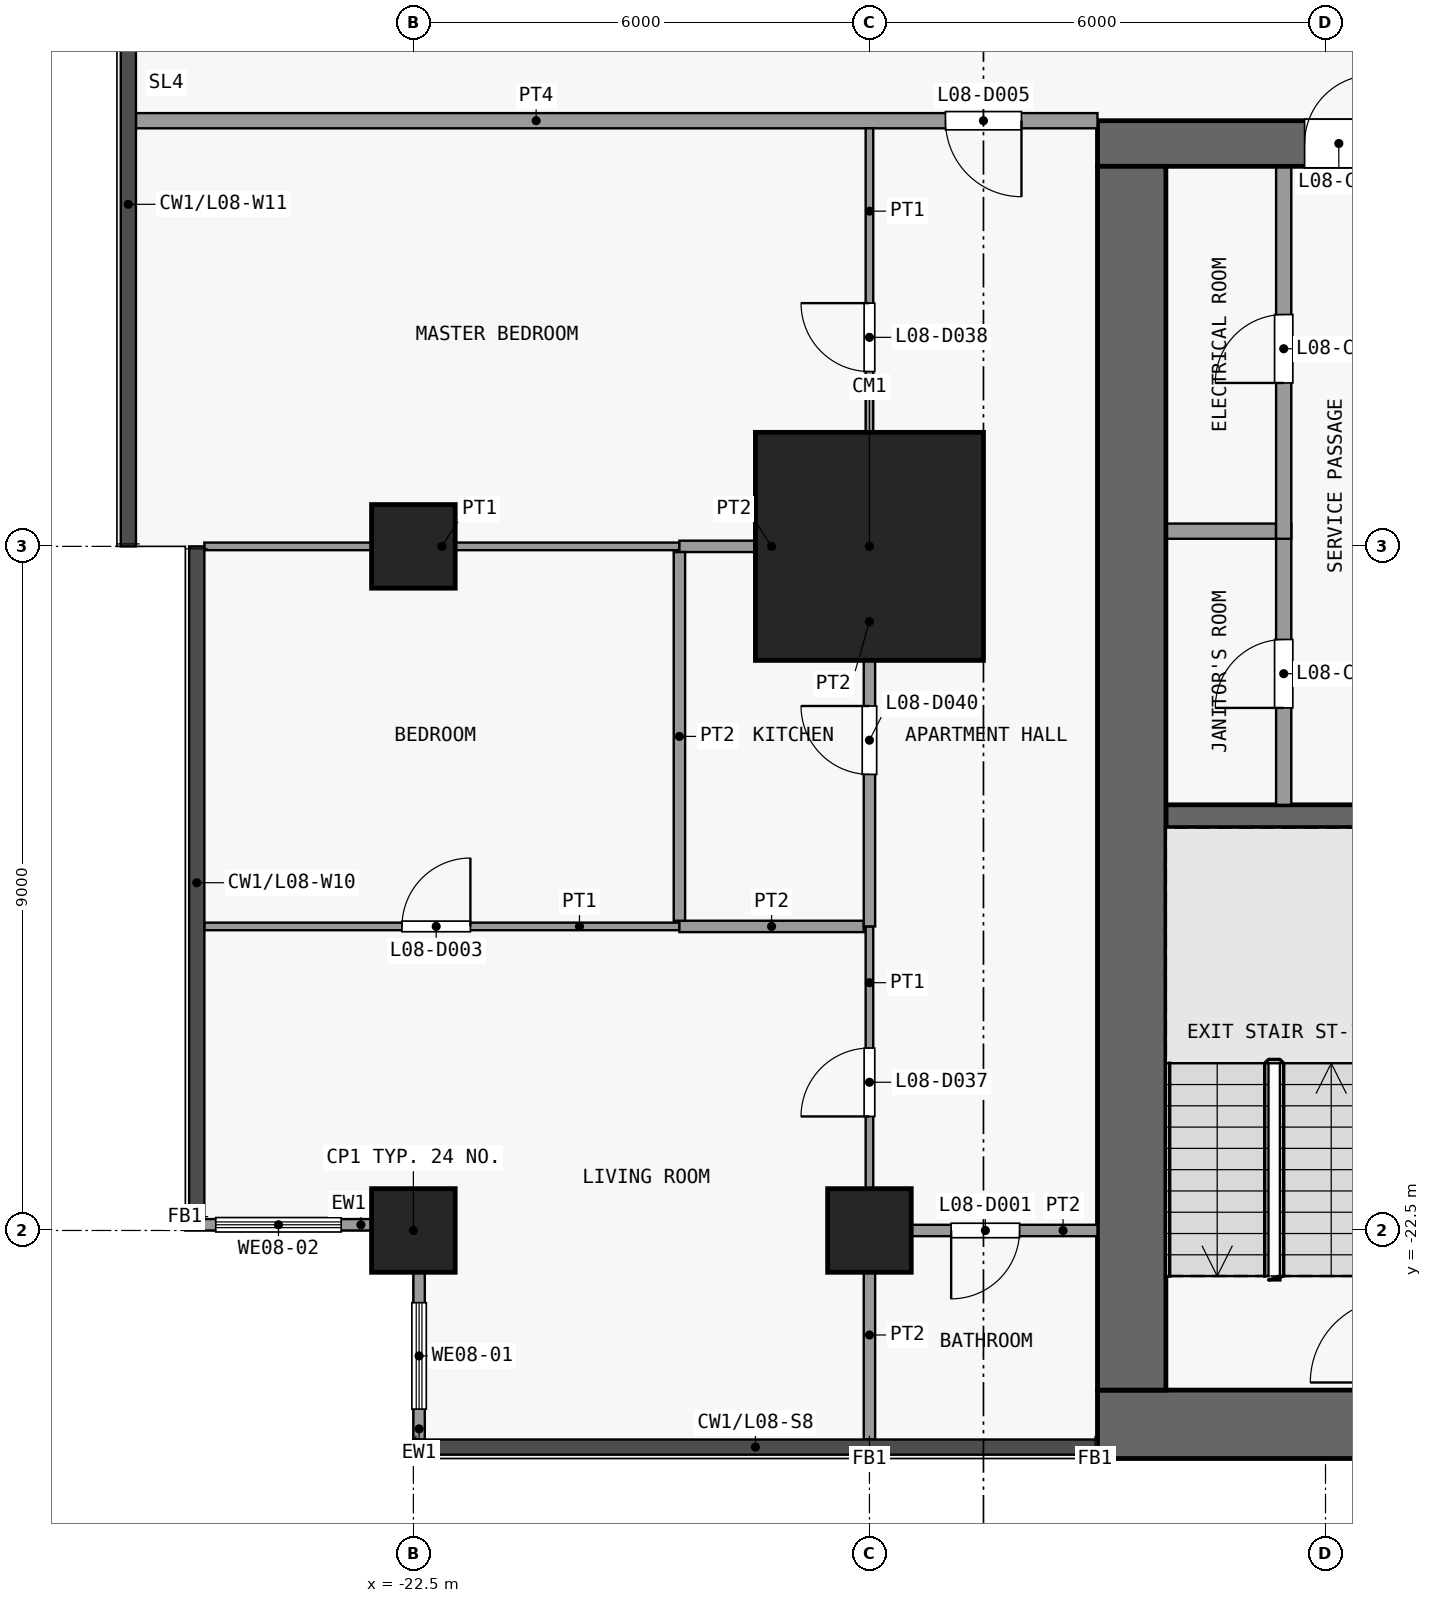
"""IFC4 building model, lengths in metres.
Left out: names, types, materials, properties, quantities, classifications, styles, units other than length and angle.
Written with IfcOpenShell. Run it as: python <this file> out.ifc"""

import sys

from ifc_helpers import new_model, si_unit, direction, frame, frame_2d, origin, origin_2d, place, context, subcontext, project, spatial, rectangle, extrude, element, fill, save


model = new_model("IFC4")
c1 = context("Model", 3, precision=1e-05, world=origin(), true_north=direction((0.0, 1.0)))
c2 = subcontext(c1, "Body", "Model", "MODEL_VIEW")
j1 = project(units=[si_unit("LENGTHUNIT", "METRE"), si_unit("PLANEANGLEUNIT", "RADIAN")], contexts=[c1])
p1 = place(None, origin())
s1 = spatial("IfcSite", under=j1, at=p1, CompositionType="ELEMENT")
p2 = place(p1, origin())
s2 = spatial("IfcBuilding", under=s1, at=p2, CompositionType="ELEMENT")
p3 = place(p2, frame((0.0, 0.0, 39.7)))
s3 = spatial("IfcBuildingStorey", under=s2, at=p3, CompositionType="ELEMENT", Elevation=39.7)
for number, where, z_axis, x_axis in (
    (1, (-22.5, -22.5, 0.0), (0.0, 0.0, 1.0), (1.0, 0.0, 0.0)),
    (2, (-22.5, -13.5, 0.0), (0.0, 0.0, 1.0), (1.0, 0.0, 0.0)),
    (3, (-16.5, -22.5, 0.0), (0.0, 0.0, 1.0), (1.0, 0.0, 0.0)),
):
    element("IfcColumn", number, at=place(p3, frame(where, z_axis=z_axis, x_axis=x_axis)), inside=s3, PredefinedType="COLUMN", context=c2, shape_type="SweptSolid", body=[
        extrude(rectangle(XDim=1.1, YDim=1.1, at=origin_2d()), origin(), (0.0, 0.0, 1.0), 3.6),
    ])
p4 = place(p3, frame((-16.5, -13.5, 0.0), z_axis=(0.0, 0.0, 1.0), x_axis=(1.0, 0.0, 0.0)))
e4 = element("IfcColumn", 4, at=p4, inside=s3, PredefinedType="COLUMN", context=c2, shape_type="SweptSolid", body=[
    extrude(rectangle(XDim=3.0, YDim=3.0, at=origin_2d()), origin(), (0.0, 0.0, 1.0), 3.6),
])
p5 = place(p3, frame((-13.5, -25.05, 0.0), z_axis=(0.0, 0.0, 1.0), x_axis=(1.0, 0.0, 0.0)))
e5 = element("IfcWall", 5, at=p5, inside=s3, PredefinedType="SHEAR", context=c2, shape_type="SweptSolid", body=[
    extrude(rectangle(XDim=27.0, YDim=0.9, at=frame_2d((13.5, 0.0))), origin(), (0.0, 0.0, 1.0), 3.3),
])
p6 = place(p3, frame((-13.5, -8.2, 0.0), z_axis=(0.0, 0.0, 1.0), x_axis=(1.0, 0.0, 0.0)))
e6 = element("IfcWall", 6, at=p6, inside=s3, PredefinedType="SHEAR", context=c2, shape_type="SweptSolid", body=[
    extrude(rectangle(XDim=27.0, YDim=0.6, at=frame_2d((13.5, 0.0))), origin(), (0.0, 0.0, 1.0), 3.3),
])
p7 = place(p6, frame((7.8, 0.0, 0.0)))
e7 = element("IfcOpeningElement", 7, at=p7, cuts=e6, PredefinedType="OPENING", context=c2, shape_type="SweptSolid", body=[
    extrude(rectangle(XDim=1.8, YDim=2.1, at=frame_2d((0.9, 1.05))), frame((0.0, 0.31, 0.0), z_axis=(0.0, -1.0, 0.0), x_axis=(1.0, 0.0, 0.0)), (0.0, 0.0, 1.0), 0.62),
])
p8 = place(p6, frame((17.4, 0.0, 0.0)))
e8 = element("IfcOpeningElement", 8, at=p8, cuts=e6, PredefinedType="OPENING", context=c2, shape_type="SweptSolid", body=[
    extrude(rectangle(XDim=1.8, YDim=2.1, at=frame_2d((0.9, 1.05))), frame((0.0, 0.31, 0.0), z_axis=(0.0, -1.0, 0.0), x_axis=(1.0, 0.0, 0.0)), (0.0, 0.0, 1.0), 0.62),
])
p9 = place(p6, frame((2.725, 0.0, 0.0)))
e9 = element("IfcOpeningElement", 9, at=p9, cuts=e6, PredefinedType="OPENING", context=c2, shape_type="SweptSolid", body=[
    extrude(rectangle(XDim=0.9, YDim=2.1, at=frame_2d((0.45, 1.05))), frame((0.0, 0.31, 0.0), z_axis=(0.0, -1.0, 0.0), x_axis=(1.0, 0.0, 0.0)), (0.0, 0.0, 1.0), 0.62),
])
p10 = place(p6, frame((23.375, 0.0, 0.0)))
e10 = element("IfcOpeningElement", 10, at=p10, cuts=e6, PredefinedType="OPENING", context=c2, shape_type="SweptSolid", body=[
    extrude(rectangle(XDim=0.9, YDim=2.1, at=frame_2d((0.45, 1.05))), frame((0.0, 0.31, 0.0), z_axis=(0.0, -1.0, 0.0), x_axis=(1.0, 0.0, 0.0)), (0.0, 0.0, 1.0), 0.62),
])
p11 = place(p3, frame((-13.05, -24.6, 0.0), z_axis=(0.0, 0.0, 1.0), x_axis=(0.0, 1.0, 0.0)))
e11 = element("IfcWall", 11, at=p11, inside=s3, PredefinedType="SHEAR", context=c2, shape_type="SweptSolid", body=[
    extrude(rectangle(XDim=16.1, YDim=0.9, at=frame_2d((8.05, 0.0))), origin(), (0.0, 0.0, 1.0), 3.3),
])
p12 = place(p3, frame((-12.6, -17.05, 0.0), z_axis=(0.0, 0.0, 1.0), x_axis=(1.0, 0.0, 0.0)))
e12 = element("IfcWall", 12, at=p12, inside=s3, PredefinedType="SHEAR", context=c2, shape_type="SweptSolid", body=[
    extrude(rectangle(XDim=2.85, YDim=0.3, at=frame_2d((1.425, 0.0))), origin(), (0.0, 0.0, 1.0), 3.3),
])
p13 = place(p3, frame((-12.6, -13.3, 0.0), z_axis=(0.0, 0.0, 1.0), x_axis=(1.0, 0.0, 0.0)))
e13 = element("IfcWall", 13, at=p13, inside=s3, PredefinedType="PARTITIONING", context=c2, shape_type="SweptSolid", body=[
    extrude(rectangle(XDim=1.45, YDim=0.2, at=frame_2d((0.725, 0.0))), origin(), (0.0, 0.0, 1.0), 3.3),
])
p14 = place(p3, frame((-11.05, -16.9, 0.0), z_axis=(0.0, 0.0, 1.0), x_axis=(0.0, 1.0, 0.0)))
e14 = element("IfcWall", 14, at=p14, inside=s3, PredefinedType="PARTITIONING", context=c2, shape_type="SweptSolid", body=[
    extrude(rectangle(XDim=3.7, YDim=0.2, at=frame_2d((1.85, 0.0))), origin(), (0.0, 0.0, 1.0), 3.3),
])
p15 = place(p14, frame((1.275, 0.0, 0.0)))
e15 = element("IfcOpeningElement", 15, at=p15, cuts=e14, PredefinedType="OPENING", context=c2, shape_type="SweptSolid", body=[
    extrude(rectangle(XDim=0.9, YDim=2.1, at=frame_2d((0.45, 1.05))), frame((0.0, 0.11, 0.0), z_axis=(0.0, -1.0, 0.0), x_axis=(1.0, 0.0, 0.0)), (0.0, 0.0, 1.0), 0.22),
])
p16 = place(p3, frame((-11.05, -13.4, 0.0), z_axis=(0.0, 0.0, 1.0), x_axis=(0.0, 1.0, 0.0)))
e16 = element("IfcWall", 16, at=p16, inside=s3, PredefinedType="PARTITIONING", context=c2, shape_type="SweptSolid", body=[
    extrude(rectangle(XDim=4.9, YDim=0.2, at=frame_2d((2.45, 0.0))), origin(), (0.0, 0.0, 1.0), 3.3),
])
p17 = place(p16, frame((2.05, 0.0, 0.0)))
e17 = element("IfcOpeningElement", 17, at=p17, cuts=e16, PredefinedType="OPENING", context=c2, shape_type="SweptSolid", body=[
    extrude(rectangle(XDim=0.9, YDim=2.1, at=frame_2d((0.45, 1.05))), frame((0.0, 0.11, 0.0), z_axis=(0.0, -1.0, 0.0), x_axis=(1.0, 0.0, 0.0)), (0.0, 0.0, 1.0), 0.22),
])
p18 = place(p3, frame((-22.425, -25.25, 0.0), z_axis=(0.0, 0.0, 1.0), x_axis=(0.0, 1.0, 0.0)))
e18 = element("IfcWall", 18, at=p18, inside=s3, PredefinedType="SOLIDWALL", context=c2, shape_type="SweptSolid", body=[
    extrude(rectangle(XDim=2.2, YDim=0.15, at=frame_2d((1.1, 0.0))), origin(), (0.0, 0.0, 1.0), 3.3),
])
p19 = place(p18, frame((0.4, 0.0, 0.9)))
e19 = element("IfcOpeningElement", 19, at=p19, cuts=e18, PredefinedType="OPENING", context=c2, shape_type="SweptSolid", body=[
    extrude(rectangle(XDim=1.4, YDim=2.4, at=frame_2d((0.7, 1.2))), frame((0.0, 0.085, 0.0), z_axis=(0.0, -1.0, 0.0), x_axis=(1.0, 0.0, 0.0)), (0.0, 0.0, 1.0), 0.17),
])
p20 = place(p3, frame((-23.05, -22.425, 0.0), z_axis=(0.0, 0.0, 1.0), x_axis=(-1.0, 0.0, 0.0)))
e20 = element("IfcWall", 20, at=p20, inside=s3, PredefinedType="SOLIDWALL", context=c2, shape_type="SweptSolid", body=[
    extrude(rectangle(XDim=2.45, YDim=0.15, at=frame_2d((1.225, 0.0))), origin(), (0.0, 0.0, 1.0), 3.3),
])
p21 = place(p20, frame((0.4, 0.0, 0.9)))
e21 = element("IfcOpeningElement", 21, at=p21, cuts=e20, PredefinedType="OPENING", context=c2, shape_type="SweptSolid", body=[
    extrude(rectangle(XDim=1.65, YDim=2.4, at=frame_2d((0.825, 1.2))), frame((0.0, 0.085, 0.0), z_axis=(0.0, -1.0, 0.0), x_axis=(1.0, 0.0, 0.0)), (0.0, 0.0, 1.0), 0.17),
])
p22 = place(p3, frame((-16.425, -22.5, 0.0), z_axis=(0.0, 0.0, 1.0), x_axis=(1.0, 0.0, 0.0)))
e22 = element("IfcWall", 22, at=p22, inside=s3, PredefinedType="PARTITIONING", context=c2, shape_type="SweptSolid", body=[
    extrude(rectangle(XDim=2.925, YDim=0.15, at=frame_2d((1.462, 0.0))), origin(), (0.0, 0.0, 1.0), 3.3),
])
p23 = place(p22, frame((1.0, 0.0, 0.0)))
e23 = element("IfcOpeningElement", 23, at=p23, cuts=e22, PredefinedType="OPENING", context=c2, shape_type="SweptSolid", body=[
    extrude(rectangle(XDim=0.9, YDim=2.1, at=frame_2d((0.45, 1.05))), frame((0.0, 0.085, 0.0), z_axis=(0.0, -1.0, 0.0), x_axis=(1.0, 0.0, 0.0)), (0.0, 0.0, 1.0), 0.17),
])
p24 = place(p3, frame((-25.25, -18.5, 0.0), z_axis=(0.0, 0.0, 1.0), x_axis=(1.0, 0.0, 0.0)))
e24 = element("IfcWall", 24, at=p24, inside=s3, PredefinedType="PARTITIONING", context=c2, shape_type="SweptSolid", body=[
    extrude(rectangle(XDim=6.25, YDim=0.1, at=frame_2d((3.125, 0.0))), origin(), (0.0, 0.0, 1.0), 3.3),
])
p25 = place(p24, frame((2.6, 0.0, 0.0)))
e25 = element("IfcOpeningElement", 25, at=p25, cuts=e24, PredefinedType="OPENING", context=c2, shape_type="SweptSolid", body=[
    extrude(rectangle(XDim=0.9, YDim=2.1, at=frame_2d((0.45, 1.05))), frame((0.0, 0.06, 0.0), z_axis=(0.0, -1.0, 0.0), x_axis=(1.0, 0.0, 0.0)), (0.0, 0.0, 1.0), 0.12),
])
p26 = place(p3, frame((-19.0, -18.5, 0.0), z_axis=(0.0, 0.0, 1.0), x_axis=(1.0, 0.0, 0.0)))
e26 = element("IfcWall", 26, at=p26, inside=s3, PredefinedType="PARTITIONING", context=c2, shape_type="SweptSolid", body=[
    extrude(rectangle(XDim=2.425, YDim=0.15, at=frame_2d((1.212, 0.0))), origin(), (0.0, 0.0, 1.0), 3.3),
])
p27 = place(p3, frame((-25.25, -13.5, 0.0), z_axis=(0.0, 0.0, 1.0), x_axis=(1.0, 0.0, 0.0)))
e27 = element("IfcWall", 27, at=p27, inside=s3, PredefinedType="PARTITIONING", context=c2, shape_type="SweptSolid", body=[
    extrude(rectangle(XDim=6.25, YDim=0.1, at=frame_2d((3.125, 0.0))), origin(), (0.0, 0.0, 1.0), 3.3),
])
p28 = place(p3, frame((-19.0, -13.5, 0.0), z_axis=(0.0, 0.0, 1.0), x_axis=(1.0, 0.0, 0.0)))
e28 = element("IfcWall", 28, at=p28, inside=s3, PredefinedType="PARTITIONING", context=c2, shape_type="SweptSolid", body=[
    extrude(rectangle(XDim=2.425, YDim=0.15, at=frame_2d((1.212, 0.0))), origin(), (0.0, 0.0, 1.0), 3.3),
])
p29 = place(p3, frame((-26.15, -7.9, 0.0), z_axis=(0.0, 0.0, 1.0), x_axis=(1.0, 0.0, 0.0)))
e29 = element("IfcWall", 29, at=p29, inside=s3, PredefinedType="PARTITIONING", context=c2, shape_type="SweptSolid", body=[
    extrude(rectangle(XDim=12.65, YDim=0.2, at=frame_2d((6.325, 0.0))), origin(), (0.0, 0.0, 1.0), 3.3),
])
p30 = place(p29, frame((10.65, 0.0, 0.0)))
e30 = element("IfcOpeningElement", 30, at=p30, cuts=e29, PredefinedType="OPENING", context=c2, shape_type="SweptSolid", body=[
    extrude(rectangle(XDim=1.0, YDim=2.1, at=frame_2d((0.5, 1.05))), frame((0.0, 0.11, 0.0), z_axis=(0.0, -1.0, 0.0), x_axis=(1.0, 0.0, 0.0)), (0.0, 0.0, 1.0), 0.22),
])
p31 = place(p3, frame((-19.0, -18.425, 0.0), z_axis=(0.0, 0.0, 1.0), x_axis=(0.0, 1.0, 0.0)))
e31 = element("IfcWall", 31, at=p31, inside=s3, PredefinedType="PARTITIONING", context=c2, shape_type="SweptSolid", body=[
    extrude(rectangle(XDim=4.85, YDim=0.15, at=frame_2d((2.425, 0.0))), origin(), (0.0, 0.0, 1.0), 3.3),
])
p32 = place(p3, frame((-16.5, -22.5, 0.0), z_axis=(0.0, 0.0, 1.0), x_axis=(0.0, 1.0, 0.0)))
e32 = element("IfcWall", 32, at=p32, inside=s3, PredefinedType="PARTITIONING", context=c2, shape_type="SweptSolid", body=[
    extrude(rectangle(XDim=4.0, YDim=0.1, at=frame_2d((2.0, 0.0))), origin(), (0.0, 0.0, 1.0), 3.3),
])
p33 = place(p32, frame((1.5, 0.0, 0.0)))
e33 = element("IfcOpeningElement", 33, at=p33, cuts=e32, PredefinedType="OPENING", context=c2, shape_type="SweptSolid", body=[
    extrude(rectangle(XDim=0.9, YDim=2.1, at=frame_2d((0.45, 1.05))), frame((0.0, 0.06, 0.0), z_axis=(0.0, -1.0, 0.0), x_axis=(1.0, 0.0, 0.0)), (0.0, 0.0, 1.0), 0.12),
])
p34 = place(p3, frame((-16.5, -13.5, 0.0), z_axis=(0.0, 0.0, 1.0), x_axis=(0.0, 1.0, 0.0)))
e34 = element("IfcWall", 34, at=p34, inside=s3, PredefinedType="PARTITIONING", context=c2, shape_type="SweptSolid", body=[
    extrude(rectangle(XDim=5.5, YDim=0.1, at=frame_2d((2.75, 0.0))), origin(), (0.0, 0.0, 1.0), 3.3),
])
p35 = place(p34, frame((2.3, 0.0, 0.0)))
e35 = element("IfcOpeningElement", 35, at=p35, cuts=e34, PredefinedType="OPENING", context=c2, shape_type="SweptSolid", body=[
    extrude(rectangle(XDim=0.9, YDim=2.1, at=frame_2d((0.45, 1.05))), frame((0.0, 0.06, 0.0), z_axis=(0.0, -1.0, 0.0), x_axis=(1.0, 0.0, 0.0)), (0.0, 0.0, 1.0), 0.12),
])
p36 = place(p3, frame((-16.5, -25.25, 0.0), z_axis=(0.0, 0.0, 1.0), x_axis=(0.0, 1.0, 0.0)))
e36 = element("IfcWall", 36, at=p36, inside=s3, PredefinedType="PARTITIONING", context=c2, shape_type="SweptSolid", body=[
    extrude(rectangle(XDim=2.75, YDim=0.15, at=frame_2d((1.375, 0.0))), origin(), (0.0, 0.0, 1.0), 3.3),
])
p37 = place(p3, frame((-16.5, -18.5, 0.0), z_axis=(0.0, 0.0, 1.0), x_axis=(0.0, 1.0, 0.0)))
e37 = element("IfcWall", 37, at=p37, inside=s3, PredefinedType="PARTITIONING", context=c2, shape_type="SweptSolid", body=[
    extrude(rectangle(XDim=5.0, YDim=0.15, at=frame_2d((2.5, 0.0))), origin(), (0.0, 0.0, 1.0), 3.3),
])
p38 = place(p37, frame((2.0, 0.0, 0.0)))
e38 = element("IfcOpeningElement", 38, at=p38, cuts=e37, PredefinedType="OPENING", context=c2, shape_type="SweptSolid", body=[
    extrude(rectangle(XDim=0.9, YDim=2.1, at=frame_2d((0.45, 1.05))), frame((0.0, 0.085, 0.0), z_axis=(0.0, -1.0, 0.0), x_axis=(1.0, 0.0, 0.0)), (0.0, 0.0, 1.0), 0.17),
])
p39 = place(p17, origin())
e39 = element("IfcDoor", 39, at=p39, inside=s3, OperationType="SINGLE_SWING_LEFT", PredefinedType="DOOR", context=c2, shape_type="SweptSolid", body=[
    extrude(rectangle(XDim=0.9, YDim=2.1, at=frame_2d((0.45, 1.05))), frame((0.0, 0.025, 0.0), z_axis=(0.0, -1.0, 0.0), x_axis=(1.0, 0.0, 0.0)), (0.0, 0.0, 1.0), 0.05),
])
fill(e17, e39)
p40 = place(p9, origin())
e40 = element("IfcDoor", 40, at=p40, inside=s3, OperationType="SINGLE_SWING_RIGHT", PredefinedType="DOOR", context=c2, shape_type="SweptSolid", body=[
    extrude(rectangle(XDim=0.9, YDim=2.1, at=frame_2d((0.45, 1.05))), frame((0.0, 0.025, 0.0), z_axis=(0.0, -1.0, 0.0), x_axis=(1.0, 0.0, 0.0)), (0.0, 0.0, 1.0), 0.05),
])
fill(e9, e40)
p41 = place(p15, origin())
e41 = element("IfcDoor", 41, at=p41, inside=s3, OperationType="SINGLE_SWING_LEFT", PredefinedType="DOOR", context=c2, shape_type="SweptSolid", body=[
    extrude(rectangle(XDim=0.9, YDim=2.1, at=frame_2d((0.45, 1.05))), frame((0.0, 0.025, 0.0), z_axis=(0.0, -1.0, 0.0), x_axis=(1.0, 0.0, 0.0)), (0.0, 0.0, 1.0), 0.05),
])
fill(e15, e41)
p42 = place(p19, origin())
e42 = element("IfcWindow", 42, at=p42, inside=s3, PartitioningType="SINGLE_PANEL", PredefinedType="WINDOW", context=c2, shape_type="SweptSolid", body=[
    extrude(rectangle(XDim=1.4, YDim=2.4, at=frame_2d((0.7, 1.2))), frame((0.0, 0.03, 0.0), z_axis=(0.0, -1.0, 0.0), x_axis=(1.0, 0.0, 0.0)), (0.0, 0.0, 1.0), 0.06),
])
fill(e19, e42)
p43 = place(p21, origin())
e43 = element("IfcWindow", 43, at=p43, inside=s3, PartitioningType="SINGLE_PANEL", PredefinedType="WINDOW", context=c2, shape_type="SweptSolid", body=[
    extrude(rectangle(XDim=1.65, YDim=2.4, at=frame_2d((0.825, 1.2))), frame((0.0, 0.03, 0.0), z_axis=(0.0, -1.0, 0.0), x_axis=(1.0, 0.0, 0.0)), (0.0, 0.0, 1.0), 0.06),
])
fill(e21, e43)
p44 = place(p23, origin())
e44 = element("IfcDoor", 44, at=p44, inside=s3, OperationType="SINGLE_SWING_LEFT", PredefinedType="DOOR", context=c2, shape_type="SweptSolid", body=[
    extrude(rectangle(XDim=0.9, YDim=2.1, at=frame_2d((0.45, 1.05))), frame((0.0, 0.025, 0.0), z_axis=(0.0, -1.0, 0.0), x_axis=(1.0, 0.0, 0.0)), (0.0, 0.0, 1.0), 0.05),
])
fill(e23, e44)
p45 = place(p25, origin())
e45 = element("IfcDoor", 45, at=p45, inside=s3, OperationType="SINGLE_SWING_LEFT", PredefinedType="DOOR", context=c2, shape_type="SweptSolid", body=[
    extrude(rectangle(XDim=0.9, YDim=2.1, at=frame_2d((0.45, 1.05))), frame((0.0, 0.025, 0.0), z_axis=(0.0, -1.0, 0.0), x_axis=(1.0, 0.0, 0.0)), (0.0, 0.0, 1.0), 0.05),
])
fill(e25, e45)
p46 = place(p30, origin())
e46 = element("IfcDoor", 46, at=p46, inside=s3, OperationType="SINGLE_SWING_RIGHT", PredefinedType="DOOR", context=c2, shape_type="SweptSolid", body=[
    extrude(rectangle(XDim=1.0, YDim=2.1, at=frame_2d((0.5, 1.05))), frame((0.0, 0.025, 0.0), z_axis=(0.0, -1.0, 0.0), x_axis=(1.0, 0.0, 0.0)), (0.0, 0.0, 1.0), 0.05),
])
fill(e30, e46)
p47 = place(p33, origin())
e47 = element("IfcDoor", 47, at=p47, inside=s3, OperationType="SINGLE_SWING_RIGHT", PredefinedType="DOOR", context=c2, shape_type="SweptSolid", body=[
    extrude(rectangle(XDim=0.9, YDim=2.1, at=frame_2d((0.45, 1.05))), frame((0.0, 0.025, 0.0), z_axis=(0.0, -1.0, 0.0), x_axis=(1.0, 0.0, 0.0)), (0.0, 0.0, 1.0), 0.05),
])
fill(e33, e47)
p48 = place(p35, origin())
e48 = element("IfcDoor", 48, at=p48, inside=s3, OperationType="SINGLE_SWING_LEFT", PredefinedType="DOOR", context=c2, shape_type="SweptSolid", body=[
    extrude(rectangle(XDim=0.9, YDim=2.1, at=frame_2d((0.45, 1.05))), frame((0.0, 0.025, 0.0), z_axis=(0.0, -1.0, 0.0), x_axis=(1.0, 0.0, 0.0)), (0.0, 0.0, 1.0), 0.05),
])
fill(e35, e48)
p49 = place(p38, origin())
e49 = element("IfcDoor", 49, at=p49, inside=s3, OperationType="SINGLE_SWING_LEFT", PredefinedType="DOOR", context=c2, shape_type="SweptSolid", body=[
    extrude(rectangle(XDim=0.9, YDim=2.1, at=frame_2d((0.45, 1.05))), frame((0.0, 0.025, 0.0), z_axis=(0.0, -1.0, 0.0), x_axis=(1.0, 0.0, 0.0)), (0.0, 0.0, 1.0), 0.05),
])
fill(e38, e49)
save(model, sys.argv[1])
